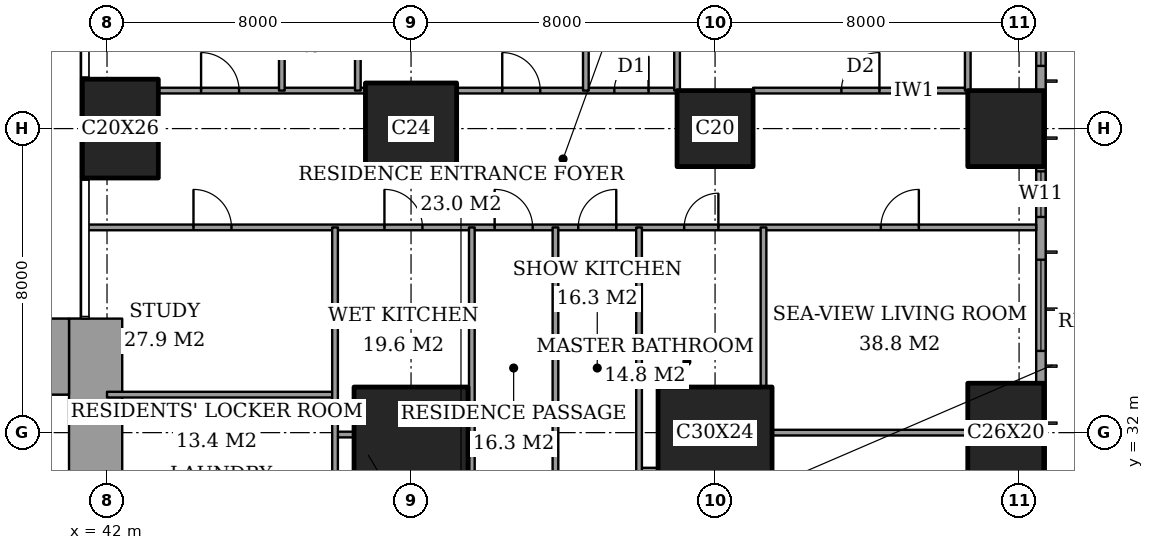
"""IFC4 building model, lengths in metres.
Left out: names, types, materials, properties, quantities, classifications, styles, units other than length and angle.
Written with IfcOpenShell. Run it as: python <this file> out.ifc"""

import sys

from ifc_helpers import new_model, si_unit, direction, frame, frame_2d, origin, origin_2d, place, context, subcontext, project, spatial, rectangle, extrude, element, fill, save


model = new_model("IFC4")
c1 = context("Model", 3, precision=1e-05, world=origin(), true_north=direction((0.0, 1.0)))
c2 = subcontext(c1, "Body", "Model", "MODEL_VIEW")
j1 = project(units=[si_unit("LENGTHUNIT", "METRE"), si_unit("PLANEANGLEUNIT", "RADIAN")], contexts=[c1])
p1 = place(None, origin())
s1 = spatial("IfcSite", under=j1, at=p1, CompositionType="ELEMENT")
p2 = place(p1, origin())
s2 = spatial("IfcBuilding", under=s1, at=p2, CompositionType="ELEMENT")
p3 = place(p2, frame((0.0, 0.0, 110.6)))
s3 = spatial("IfcBuildingStorey", under=s2, at=p3, CompositionType="ELEMENT", Elevation=110.6)
p4 = place(p3, frame((42.35, 40.0, 0.0), z_axis=(0.0, 0.0, 1.0), x_axis=(1.0, 0.0, 0.0)))
e1 = element("IfcColumn", 1, at=p4, inside=s3, PredefinedType="COLUMN", context=c2, shape_type="SweptSolid", body=[
    extrude(rectangle(XDim=2.0, YDim=2.6, at=origin_2d()), origin(), (0.0, 0.0, 1.0), 3.6),
])
p5 = place(p3, frame((50.0, 32.0, 0.0), z_axis=(0.0, 0.0, 1.0), x_axis=(1.0, 0.0, 0.0)))
e2 = element("IfcColumn", 2, at=p5, inside=s3, PredefinedType="COLUMN", context=c2, shape_type="SweptSolid", body=[
    extrude(rectangle(XDim=3.0, YDim=2.4, at=origin_2d()), origin(), (0.0, 0.0, 1.0), 3.6),
])
p6 = place(p3, frame((50.0, 40.0, 0.0), z_axis=(0.0, 0.0, 1.0), x_axis=(1.0, 0.0, 0.0)))
e3 = element("IfcColumn", 3, at=p6, inside=s3, PredefinedType="COLUMN", context=c2, shape_type="SweptSolid", body=[
    extrude(rectangle(XDim=2.4, YDim=2.4, at=origin_2d()), origin(), (0.0, 0.0, 1.0), 3.6),
])
p7 = place(p3, frame((58.0, 32.0, 0.0), z_axis=(0.0, 0.0, 1.0), x_axis=(1.0, 0.0, 0.0)))
e4 = element("IfcColumn", 4, at=p7, inside=s3, PredefinedType="COLUMN", context=c2, shape_type="SweptSolid", body=[
    extrude(rectangle(XDim=3.0, YDim=2.4, at=origin_2d()), origin(), (0.0, 0.0, 1.0), 3.6),
])
p8 = place(p3, frame((58.0, 40.0, 0.0), z_axis=(0.0, 0.0, 1.0), x_axis=(1.0, 0.0, 0.0)))
e5 = element("IfcColumn", 5, at=p8, inside=s3, PredefinedType="COLUMN", context=c2, shape_type="SweptSolid", body=[
    extrude(rectangle(XDim=2.0, YDim=2.0, at=origin_2d()), origin(), (0.0, 0.0, 1.0), 3.6),
])
p9 = place(p3, frame((65.65, 32.0, 0.0), z_axis=(0.0, 0.0, 1.0), x_axis=(0.0, 1.0, 0.0)))
e6 = element("IfcColumn", 6, at=p9, inside=s3, PredefinedType="COLUMN", context=c2, shape_type="SweptSolid", body=[
    extrude(rectangle(XDim=2.6, YDim=2.0, at=origin_2d()), origin(), (0.0, 0.0, 1.0), 3.6),
])
p10 = place(p3, frame((65.65, 40.0, 0.0), z_axis=(0.0, 0.0, 1.0), x_axis=(1.0, 0.0, 0.0)))
e7 = element("IfcColumn", 7, at=p10, inside=s3, PredefinedType="COLUMN", context=c2, shape_type="SweptSolid", body=[
    extrude(rectangle(XDim=2.0, YDim=2.0, at=origin_2d()), origin(), (0.0, 0.0, 1.0), 3.6),
])
p11 = place(p3, frame((37.85, 34.0, 0.0), z_axis=(0.0, 0.0, 1.0), x_axis=(1.0, 0.0, 0.0)))
e8 = element("IfcWall", 8, at=p11, inside=s3, PredefinedType="SHEAR", context=c2, shape_type="SweptSolid", body=[
    extrude(rectangle(XDim=3.15, YDim=2.0, at=frame_2d((1.575, 0.0))), origin(), (0.0, 0.0, 1.0), 3.6),
])
p12 = place(p3, frame((41.7, 24.85, 0.0), z_axis=(0.0, 0.0, 1.0), x_axis=(0.0, 1.0, 0.0)))
e9 = element("IfcWall", 9, at=p12, inside=s3, PredefinedType="SHEAR", context=c2, shape_type="SweptSolid", body=[
    extrude(rectangle(XDim=10.15, YDim=1.4, at=frame_2d((5.075, 0.0))), origin(), (0.0, 0.0, 1.0), 3.6),
])
p13 = place(p3, frame((66.575, 3.175, 0.0), z_axis=(0.0, 0.0, 1.0), x_axis=(0.0, 1.0, 0.0)))
e10 = element("IfcWall", 10, at=p13, inside=s3, PredefinedType="SOLIDWALL", context=c2, shape_type="SweptSolid", body=[
    extrude(rectangle(XDim=41.65, YDim=0.25, at=frame_2d((20.825, 0.0))), origin(), (0.0, 0.0, 1.0), 3.6),
])
p14 = place(p13, frame((0.775, 0.0, 0.4)))
e11 = element("IfcOpeningElement", 11, at=p14, cuts=e10, PredefinedType="OPENING", context=c2, shape_type="SweptSolid", body=[
    extrude(rectangle(XDim=2.4, YDim=2.2, at=frame_2d((1.2, 1.1))), frame((0.0, 0.135, 0.0), z_axis=(0.0, -1.0, 0.0), x_axis=(1.0, 0.0, 0.0)), (0.0, 0.0, 1.0), 0.27),
])
p15 = place(p13, frame((6.1, 0.0, 0.4)))
e12 = element("IfcOpeningElement", 12, at=p15, cuts=e10, PredefinedType="OPENING", context=c2, shape_type="SweptSolid", body=[
    extrude(rectangle(XDim=1.2, YDim=2.2, at=frame_2d((0.6, 1.1))), frame((0.0, 0.135, 0.0), z_axis=(0.0, -1.0, 0.0), x_axis=(1.0, 0.0, 0.0)), (0.0, 0.0, 1.0), 0.27),
])
p16 = place(p13, frame((8.275, 0.0, 0.4)))
e13 = element("IfcOpeningElement", 13, at=p16, cuts=e10, PredefinedType="OPENING", context=c2, shape_type="SweptSolid", body=[
    extrude(rectangle(XDim=2.4, YDim=2.2, at=frame_2d((1.2, 1.1))), frame((0.0, 0.135, 0.0), z_axis=(0.0, -1.0, 0.0), x_axis=(1.0, 0.0, 0.0)), (0.0, 0.0, 1.0), 0.27),
])
p17 = place(p13, frame((15.775, 0.0, 0.4)))
e14 = element("IfcOpeningElement", 14, at=p17, cuts=e10, PredefinedType="OPENING", context=c2, shape_type="SweptSolid", body=[
    extrude(rectangle(XDim=2.4, YDim=2.2, at=frame_2d((1.2, 1.1))), frame((0.0, 0.135, 0.0), z_axis=(0.0, -1.0, 0.0), x_axis=(1.0, 0.0, 0.0)), (0.0, 0.0, 1.0), 0.27),
])
p18 = place(p13, frame((23.475, 0.0, 0.4)))
e15 = element("IfcOpeningElement", 15, at=p18, cuts=e10, PredefinedType="OPENING", context=c2, shape_type="SweptSolid", body=[
    extrude(rectangle(XDim=2.4, YDim=2.2, at=frame_2d((1.2, 1.1))), frame((0.0, 0.135, 0.0), z_axis=(0.0, -1.0, 0.0), x_axis=(1.0, 0.0, 0.0)), (0.0, 0.0, 1.0), 0.27),
])
p19 = place(p13, frame((30.975, 0.0, 0.4)))
e16 = element("IfcOpeningElement", 16, at=p19, cuts=e10, PredefinedType="OPENING", context=c2, shape_type="SweptSolid", body=[
    extrude(rectangle(XDim=2.4, YDim=2.2, at=frame_2d((1.2, 1.1))), frame((0.0, 0.135, 0.0), z_axis=(0.0, -1.0, 0.0), x_axis=(1.0, 0.0, 0.0)), (0.0, 0.0, 1.0), 0.27),
])
p20 = place(p13, frame((34.5, 0.0, 0.4)))
e17 = element("IfcOpeningElement", 17, at=p20, cuts=e10, PredefinedType="OPENING", context=c2, shape_type="SweptSolid", body=[
    extrude(rectangle(XDim=1.2, YDim=2.2, at=frame_2d((0.6, 1.1))), frame((0.0, 0.135, 0.0), z_axis=(0.0, -1.0, 0.0), x_axis=(1.0, 0.0, 0.0)), (0.0, 0.0, 1.0), 0.27),
])
p21 = place(p13, frame((38.475, 0.0, 0.4)))
e18 = element("IfcOpeningElement", 18, at=p21, cuts=e10, PredefinedType="OPENING", context=c2, shape_type="SweptSolid", body=[
    extrude(rectangle(XDim=2.4, YDim=2.2, at=frame_2d((1.2, 1.1))), frame((0.0, 0.135, 0.0), z_axis=(0.0, -1.0, 0.0), x_axis=(1.0, 0.0, 0.0)), (0.0, 0.0, 1.0), 0.27),
])
p22 = place(p3, frame((56.0, 31.0, 0.0), z_axis=(0.0, 0.0, 1.0), x_axis=(1.0, 0.0, 0.0)))
e19 = element("IfcWall", 19, at=p22, inside=s3, PredefinedType="PARTITIONING", context=c2, shape_type="SweptSolid", body=[
    extrude(rectangle(XDim=0.5, YDim=0.15, at=frame_2d((0.25, 0.0))), origin(), (0.0, 0.0, 1.0), 3.35),
])
p23 = place(p3, frame((48.0, 31.95, 0.0), z_axis=(0.0, 0.0, 1.0), x_axis=(1.0, 0.0, 0.0)))
e20 = element("IfcWall", 20, at=p23, inside=s3, PredefinedType="PARTITIONING", context=c2, shape_type="SweptSolid", body=[
    extrude(rectangle(XDim=0.5, YDim=0.15, at=frame_2d((0.25, 0.0))), origin(), (0.0, 0.0, 1.0), 2.634),
])
p24 = place(p3, frame((59.5, 32.0, 0.0), z_axis=(0.0, 0.0, 1.0), x_axis=(1.0, 0.0, 0.0)))
e21 = element("IfcWall", 21, at=p24, inside=s3, PredefinedType="PARTITIONING", context=c2, shape_type="SweptSolid", body=[
    extrude(rectangle(XDim=5.15, YDim=0.15, at=frame_2d((2.575, 0.0))), origin(), (0.0, 0.0, 1.0), 2.634),
])
p25 = place(p3, frame((42.0, 33.0, 0.0), z_axis=(0.0, 0.0, 1.0), x_axis=(1.0, 0.0, 0.0)))
e22 = element("IfcWall", 22, at=p25, inside=s3, PredefinedType="PARTITIONING", context=c2, shape_type="SweptSolid", body=[
    extrude(rectangle(XDim=6.0, YDim=0.15, at=frame_2d((3.0, 0.0))), origin(), (0.0, 0.0, 1.0), 3.35),
])
p26 = place(p3, frame((41.439, 37.4, 0.0), z_axis=(0.0, 0.0, 1.0), x_axis=(1.0, 0.0, 0.0)))
e23 = element("IfcWall", 23, at=p26, inside=s3, PredefinedType="PARTITIONING", context=c2, shape_type="SweptSolid", body=[
    extrude(rectangle(XDim=25.011, YDim=0.15, at=frame_2d((12.505, 0.0))), origin(), (0.0, 0.0, 1.0), 3.35),
])
p27 = place(p26, frame((10.761, 0.0, 0.0)))
e24 = element("IfcOpeningElement", 24, at=p27, cuts=e23, PredefinedType="OPENING", context=c2, shape_type="SweptSolid", body=[
    extrude(rectangle(XDim=1.0, YDim=2.1, at=frame_2d((0.5, 1.05))), frame((0.0, 0.085, 0.0), z_axis=(0.0, -1.0, 0.0), x_axis=(1.0, 0.0, 0.0)), (0.0, 0.0, 1.0), 0.17),
])
p28 = place(p26, frame((20.924, 0.0, 0.0)))
e25 = element("IfcOpeningElement", 25, at=p28, cuts=e23, PredefinedType="OPENING", context=c2, shape_type="SweptSolid", body=[
    extrude(rectangle(XDim=1.0, YDim=2.1, at=frame_2d((0.5, 1.05))), frame((0.0, 0.085, 0.0), z_axis=(0.0, -1.0, 0.0), x_axis=(1.0, 0.0, 0.0)), (0.0, 0.0, 1.0), 0.17),
])
p29 = place(p26, frame((15.749, 0.0, 0.0)))
e26 = element("IfcOpeningElement", 26, at=p29, cuts=e23, PredefinedType="OPENING", context=c2, shape_type="SweptSolid", body=[
    extrude(rectangle(XDim=0.9, YDim=2.1, at=frame_2d((0.45, 1.05))), frame((0.0, 0.085, 0.0), z_axis=(0.0, -1.0, 0.0), x_axis=(1.0, 0.0, 0.0)), (0.0, 0.0, 1.0), 0.17),
])
p30 = place(p26, frame((12.961, 0.0, 0.0)))
e27 = element("IfcOpeningElement", 27, at=p30, cuts=e23, PredefinedType="OPENING", context=c2, shape_type="SweptSolid", body=[
    extrude(rectangle(XDim=1.0, YDim=2.1, at=frame_2d((0.5, 1.05))), frame((0.0, 0.085, 0.0), z_axis=(0.0, -1.0, 0.0), x_axis=(1.0, 0.0, 0.0)), (0.0, 0.0, 1.0), 0.17),
])
p31 = place(p26, frame((7.861, 0.0, 0.0)))
e28 = element("IfcOpeningElement", 28, at=p31, cuts=e23, PredefinedType="OPENING", context=c2, shape_type="SweptSolid", body=[
    extrude(rectangle(XDim=1.0, YDim=2.1, at=frame_2d((0.5, 1.05))), frame((0.0, 0.085, 0.0), z_axis=(0.0, -1.0, 0.0), x_axis=(1.0, 0.0, 0.0)), (0.0, 0.0, 1.0), 0.17),
])
p32 = place(p26, frame((2.836, 0.0, 0.0)))
e29 = element("IfcOpeningElement", 29, at=p32, cuts=e23, PredefinedType="OPENING", context=c2, shape_type="SweptSolid", body=[
    extrude(rectangle(XDim=1.0, YDim=2.1, at=frame_2d((0.5, 1.05))), frame((0.0, 0.085, 0.0), z_axis=(0.0, -1.0, 0.0), x_axis=(1.0, 0.0, 0.0)), (0.0, 0.0, 1.0), 0.17),
])
p33 = place(p3, frame((43.35, 41.0, 0.0), z_axis=(0.0, 0.0, 1.0), x_axis=(1.0, 0.0, 0.0)))
e30 = element("IfcWall", 30, at=p33, inside=s3, PredefinedType="PARTITIONING", context=c2, shape_type="SweptSolid", body=[
    extrude(rectangle(XDim=5.45, YDim=0.15, at=frame_2d((2.725, 0.0))), origin(), (0.0, 0.0, 1.0), 3.35),
])
p34 = place(p33, frame((1.125, 0.0, 0.0)))
e31 = element("IfcOpeningElement", 31, at=p34, cuts=e30, PredefinedType="OPENING", context=c2, shape_type="SweptSolid", body=[
    extrude(rectangle(XDim=1.0, YDim=2.1, at=frame_2d((0.5, 1.05))), frame((0.0, 0.085, 0.0), z_axis=(0.0, -1.0, 0.0), x_axis=(1.0, 0.0, 0.0)), (0.0, 0.0, 1.0), 0.17),
])
p35 = place(p3, frame((51.2, 41.0, 0.0), z_axis=(0.0, 0.0, 1.0), x_axis=(1.0, 0.0, 0.0)))
e32 = element("IfcWall", 32, at=p35, inside=s3, PredefinedType="PARTITIONING", context=c2, shape_type="SweptSolid", body=[
    extrude(rectangle(XDim=5.8, YDim=0.15, at=frame_2d((2.9, 0.0))), origin(), (0.0, 0.0, 1.0), 3.35),
])
p36 = place(p35, frame((4.15, 0.0, 0.0)))
e33 = element("IfcOpeningElement", 33, at=p36, cuts=e32, PredefinedType="OPENING", context=c2, shape_type="SweptSolid", body=[
    extrude(rectangle(XDim=0.9, YDim=2.1, at=frame_2d((0.45, 1.05))), frame((0.0, 0.085, 0.0), z_axis=(0.0, -1.0, 0.0), x_axis=(1.0, 0.0, 0.0)), (0.0, 0.0, 1.0), 0.17),
])
p37 = place(p35, frame((1.2, 0.0, 0.0)))
e34 = element("IfcOpeningElement", 34, at=p37, cuts=e32, PredefinedType="OPENING", context=c2, shape_type="SweptSolid", body=[
    extrude(rectangle(XDim=1.0, YDim=2.1, at=frame_2d((0.5, 1.05))), frame((0.0, 0.085, 0.0), z_axis=(0.0, -1.0, 0.0), x_axis=(1.0, 0.0, 0.0)), (0.0, 0.0, 1.0), 0.17),
])
p38 = place(p3, frame((59.0, 41.0, 0.0), z_axis=(0.0, 0.0, 1.0), x_axis=(1.0, 0.0, 0.0)))
e35 = element("IfcWall", 35, at=p38, inside=s3, PredefinedType="PARTITIONING", context=c2, shape_type="SweptSolid", body=[
    extrude(rectangle(XDim=5.65, YDim=0.15, at=frame_2d((2.825, 0.0))), origin(), (0.0, 0.0, 1.0), 3.35),
])
p39 = place(p38, frame((2.325, 0.0, 0.0)))
e36 = element("IfcOpeningElement", 36, at=p39, cuts=e35, PredefinedType="OPENING", context=c2, shape_type="SweptSolid", body=[
    extrude(rectangle(XDim=1.0, YDim=2.1, at=frame_2d((0.5, 1.05))), frame((0.0, 0.085, 0.0), z_axis=(0.0, -1.0, 0.0), x_axis=(1.0, 0.0, 0.0)), (0.0, 0.0, 1.0), 0.17),
])
p40 = place(p3, frame((46.6, 41.0, 0.0), z_axis=(0.0, 0.0, 1.0), x_axis=(0.0, 1.0, 0.0)))
e37 = element("IfcWall", 37, at=p40, inside=s3, PredefinedType="PARTITIONING", context=c2, shape_type="SweptSolid", body=[
    extrude(rectangle(XDim=7.45, YDim=0.15, at=frame_2d((3.725, 0.0))), origin(), (0.0, 0.0, 1.0), 3.35),
])
p41 = place(p40, frame((3.275, 0.0, 0.0)))
e38 = element("IfcOpeningElement", 38, at=p41, cuts=e37, PredefinedType="OPENING", context=c2, shape_type="SweptSolid", body=[
    extrude(rectangle(XDim=0.9, YDim=2.1, at=frame_2d((0.45, 1.05))), frame((0.0, 0.085, 0.0), z_axis=(0.0, -1.0, 0.0), x_axis=(1.0, 0.0, 0.0)), (0.0, 0.0, 1.0), 0.17),
])
p42 = place(p3, frame((48.0, 28.0, 0.0), z_axis=(0.0, 0.0, 1.0), x_axis=(0.0, 1.0, 0.0)))
e39 = element("IfcWall", 39, at=p42, inside=s3, PredefinedType="PARTITIONING", context=c2, shape_type="SweptSolid", body=[
    extrude(rectangle(XDim=9.4, YDim=0.15, at=frame_2d((4.7, 0.0))), origin(), (0.0, 0.0, 1.0), 3.35),
])
p43 = place(p42, frame((0.55, 0.0, 0.0)))
e40 = element("IfcOpeningElement", 40, at=p43, cuts=e39, PredefinedType="OPENING", context=c2, shape_type="SweptSolid", body=[
    extrude(rectangle(XDim=0.9, YDim=2.1, at=frame_2d((0.45, 1.05))), frame((0.0, 0.085, 0.0), z_axis=(0.0, -1.0, 0.0), x_axis=(1.0, 0.0, 0.0)), (0.0, 0.0, 1.0), 0.17),
])
p44 = place(p3, frame((48.6, 41.0, 0.0), z_axis=(0.0, 0.0, 1.0), x_axis=(0.0, 1.0, 0.0)))
e41 = element("IfcWall", 41, at=p44, inside=s3, PredefinedType="PARTITIONING", context=c2, shape_type="SweptSolid", body=[
    extrude(rectangle(XDim=7.45, YDim=0.15, at=frame_2d((3.725, 0.0))), origin(), (0.0, 0.0, 1.0), 3.35),
])
for number, where, z_axis, x_axis in (
    (42, (51.6, 30.0, 0.0), (0.0, 0.0, 1.0), (0.0, 1.0, 0.0)),
    (43, (53.8, 30.0, 0.0), (0.0, 0.0, 1.0), (0.0, 1.0, 0.0)),
):
    element("IfcWall", number, at=place(p3, frame(where, z_axis=z_axis, x_axis=x_axis)), inside=s3, PredefinedType="PARTITIONING", context=c2, shape_type="SweptSolid", body=[
        extrude(rectangle(XDim=7.4, YDim=0.15, at=frame_2d((3.7, 0.0))), origin(), (0.0, 0.0, 1.0), 3.35),
    ])
p45 = place(p3, frame((54.6, 41.0, 0.0), z_axis=(0.0, 0.0, 1.0), x_axis=(0.0, 1.0, 0.0)))
e44 = element("IfcWall", 44, at=p45, inside=s3, PredefinedType="PARTITIONING", context=c2, shape_type="SweptSolid", body=[
    extrude(rectangle(XDim=7.45, YDim=0.15, at=frame_2d((3.725, 0.0))), origin(), (0.0, 0.0, 1.0), 3.35),
])
p46 = place(p3, frame((56.0, 28.0, 0.0), z_axis=(0.0, 0.0, 1.0), x_axis=(0.0, 1.0, 0.0)))
e45 = element("IfcWall", 45, at=p46, inside=s3, PredefinedType="PARTITIONING", context=c2, shape_type="SweptSolid", body=[
    extrude(rectangle(XDim=9.4, YDim=0.15, at=frame_2d((4.7, 0.0))), origin(), (0.0, 0.0, 1.0), 3.35),
])
p47 = place(p46, frame((0.5, 0.0, 0.0)))
e46 = element("IfcOpeningElement", 46, at=p47, cuts=e45, PredefinedType="OPENING", context=c2, shape_type="SweptSolid", body=[
    extrude(rectangle(XDim=1.0, YDim=2.1, at=frame_2d((0.5, 1.05))), frame((0.0, 0.085, 0.0), z_axis=(0.0, -1.0, 0.0), x_axis=(1.0, 0.0, 0.0)), (0.0, 0.0, 1.0), 0.17),
])
p48 = place(p3, frame((57.0, 41.0, 0.0), z_axis=(0.0, 0.0, 1.0), x_axis=(0.0, 1.0, 0.0)))
e47 = element("IfcWall", 47, at=p48, inside=s3, PredefinedType="PARTITIONING", context=c2, shape_type="SweptSolid", body=[
    extrude(rectangle(XDim=5.65, YDim=0.15, at=frame_2d((2.825, 0.0))), origin(), (0.0, 0.0, 1.0), 3.35),
])
p49 = place(p3, frame((59.275, 33.2, 0.0), z_axis=(0.0, 0.0, 1.0), x_axis=(0.0, 1.0, 0.0)))
e48 = element("IfcWall", 48, at=p49, inside=s3, PredefinedType="PARTITIONING", context=c2, shape_type="SweptSolid", body=[
    extrude(rectangle(XDim=4.2, YDim=0.15, at=frame_2d((2.1, 0.0))), origin(), (0.0, 0.0, 1.0), 3.35),
])
p50 = place(p3, frame((64.65, 41.0, 0.0), z_axis=(0.0, 0.0, 1.0), x_axis=(0.0, 1.0, 0.0)))
e49 = element("IfcWall", 49, at=p50, inside=s3, PredefinedType="PARTITIONING", context=c2, shape_type="SweptSolid", body=[
    extrude(rectangle(XDim=3.7, YDim=0.15, at=frame_2d((1.85, 0.0))), origin(), (0.0, 0.0, 1.0), 3.35),
])
p51 = place(p50, frame((1.4, 0.0, 0.0)))
e50 = element("IfcOpeningElement", 50, at=p51, cuts=e49, PredefinedType="OPENING", context=c2, shape_type="SweptSolid", body=[
    extrude(rectangle(XDim=0.9, YDim=2.1, at=frame_2d((0.45, 1.05))), frame((0.0, 0.085, 0.0), z_axis=(0.0, -1.0, 0.0), x_axis=(1.0, 0.0, 0.0)), (0.0, 0.0, 1.0), 0.17),
])
p52 = place(p19, origin())
e51 = element("IfcWindow", 51, at=p52, inside=s3, PartitioningType="SINGLE_PANEL", PredefinedType="WINDOW", context=c2, shape_type="SweptSolid", body=[
    extrude(rectangle(XDim=2.4, YDim=2.2, at=frame_2d((1.2, 1.1))), frame((0.0, 0.03, 0.0), z_axis=(0.0, -1.0, 0.0), x_axis=(1.0, 0.0, 0.0)), (0.0, 0.0, 1.0), 0.06),
])
fill(e16, e51)
p53 = place(p20, origin())
e52 = element("IfcWindow", 52, at=p53, inside=s3, PartitioningType="SINGLE_PANEL", PredefinedType="WINDOW", context=c2, shape_type="SweptSolid", body=[
    extrude(rectangle(XDim=1.2, YDim=2.2, at=frame_2d((0.6, 1.1))), frame((0.0, 0.03, 0.0), z_axis=(0.0, -1.0, 0.0), x_axis=(1.0, 0.0, 0.0)), (0.0, 0.0, 1.0), 0.06),
])
fill(e17, e52)
p54 = place(p21, origin())
e53 = element("IfcWindow", 53, at=p54, inside=s3, PartitioningType="SINGLE_PANEL", PredefinedType="WINDOW", context=c2, shape_type="SweptSolid", body=[
    extrude(rectangle(XDim=2.4, YDim=2.2, at=frame_2d((1.2, 1.1))), frame((0.0, 0.03, 0.0), z_axis=(0.0, -1.0, 0.0), x_axis=(1.0, 0.0, 0.0)), (0.0, 0.0, 1.0), 0.06),
])
fill(e18, e53)
p55 = place(p39, origin())
e54 = element("IfcDoor", 54, at=p55, inside=s3, OperationType="SINGLE_SWING_LEFT", PredefinedType="DOOR", context=c2, shape_type="SweptSolid", body=[
    extrude(rectangle(XDim=1.0, YDim=2.1, at=frame_2d((0.5, 1.05))), frame((0.0, 0.025, 0.0), z_axis=(0.0, -1.0, 0.0), x_axis=(1.0, 0.0, 0.0)), (0.0, 0.0, 1.0), 0.05),
])
fill(e36, e54)
p56 = place(p36, origin())
e55 = element("IfcDoor", 55, at=p56, inside=s3, OperationType="SINGLE_SWING_LEFT", PredefinedType="DOOR", context=c2, shape_type="SweptSolid", body=[
    extrude(rectangle(XDim=0.9, YDim=2.1, at=frame_2d((0.45, 1.05))), frame((0.0, 0.025, 0.0), z_axis=(0.0, -1.0, 0.0), x_axis=(1.0, 0.0, 0.0)), (0.0, 0.0, 1.0), 0.05),
])
fill(e33, e55)
p57 = place(p37, origin())
e56 = element("IfcDoor", 56, at=p57, inside=s3, OperationType="SINGLE_SWING_RIGHT", PredefinedType="DOOR", context=c2, shape_type="SweptSolid", body=[
    extrude(rectangle(XDim=1.0, YDim=2.1, at=frame_2d((0.5, 1.05))), frame((0.0, 0.025, 0.0), z_axis=(0.0, -1.0, 0.0), x_axis=(1.0, 0.0, 0.0)), (0.0, 0.0, 1.0), 0.05),
])
fill(e34, e56)
p58 = place(p34, origin())
e57 = element("IfcDoor", 57, at=p58, inside=s3, OperationType="SINGLE_SWING_RIGHT", PredefinedType="DOOR", context=c2, shape_type="SweptSolid", body=[
    extrude(rectangle(XDim=1.0, YDim=2.1, at=frame_2d((0.5, 1.05))), frame((0.0, 0.025, 0.0), z_axis=(0.0, -1.0, 0.0), x_axis=(1.0, 0.0, 0.0)), (0.0, 0.0, 1.0), 0.05),
])
fill(e31, e57)
p59 = place(p27, origin())
e58 = element("IfcDoor", 58, at=p59, inside=s3, OperationType="SINGLE_SWING_RIGHT", PredefinedType="DOOR", context=c2, shape_type="SweptSolid", body=[
    extrude(rectangle(XDim=1.0, YDim=2.1, at=frame_2d((0.5, 1.05))), frame((0.0, 0.025, 0.0), z_axis=(0.0, -1.0, 0.0), x_axis=(1.0, 0.0, 0.0)), (0.0, 0.0, 1.0), 0.05),
])
fill(e24, e58)
p60 = place(p28, origin())
e59 = element("IfcDoor", 59, at=p60, inside=s3, OperationType="SINGLE_SWING_LEFT", PredefinedType="DOOR", context=c2, shape_type="SweptSolid", body=[
    extrude(rectangle(XDim=1.0, YDim=2.1, at=frame_2d((0.5, 1.05))), frame((0.0, 0.025, 0.0), z_axis=(0.0, -1.0, 0.0), x_axis=(1.0, 0.0, 0.0)), (0.0, 0.0, 1.0), 0.05),
])
fill(e25, e59)
p61 = place(p29, origin())
e60 = element("IfcDoor", 60, at=p61, inside=s3, OperationType="SINGLE_SWING_LEFT", PredefinedType="DOOR", context=c2, shape_type="SweptSolid", body=[
    extrude(rectangle(XDim=0.9, YDim=2.1, at=frame_2d((0.45, 1.05))), frame((0.0, 0.025, 0.0), z_axis=(0.0, -1.0, 0.0), x_axis=(1.0, 0.0, 0.0)), (0.0, 0.0, 1.0), 0.05),
])
fill(e26, e60)
p62 = place(p30, origin())
e61 = element("IfcDoor", 61, at=p62, inside=s3, OperationType="SINGLE_SWING_LEFT", PredefinedType="DOOR", context=c2, shape_type="SweptSolid", body=[
    extrude(rectangle(XDim=1.0, YDim=2.1, at=frame_2d((0.5, 1.05))), frame((0.0, 0.025, 0.0), z_axis=(0.0, -1.0, 0.0), x_axis=(1.0, 0.0, 0.0)), (0.0, 0.0, 1.0), 0.05),
])
fill(e27, e61)
p63 = place(p31, origin())
e62 = element("IfcDoor", 62, at=p63, inside=s3, OperationType="SINGLE_SWING_RIGHT", PredefinedType="DOOR", context=c2, shape_type="SweptSolid", body=[
    extrude(rectangle(XDim=1.0, YDim=2.1, at=frame_2d((0.5, 1.05))), frame((0.0, 0.025, 0.0), z_axis=(0.0, -1.0, 0.0), x_axis=(1.0, 0.0, 0.0)), (0.0, 0.0, 1.0), 0.05),
])
fill(e28, e62)
p64 = place(p32, origin())
e63 = element("IfcDoor", 63, at=p64, inside=s3, OperationType="SINGLE_SWING_RIGHT", PredefinedType="DOOR", context=c2, shape_type="SweptSolid", body=[
    extrude(rectangle(XDim=1.0, YDim=2.1, at=frame_2d((0.5, 1.05))), frame((0.0, 0.025, 0.0), z_axis=(0.0, -1.0, 0.0), x_axis=(1.0, 0.0, 0.0)), (0.0, 0.0, 1.0), 0.05),
])
fill(e29, e63)
save(model, sys.argv[1])
